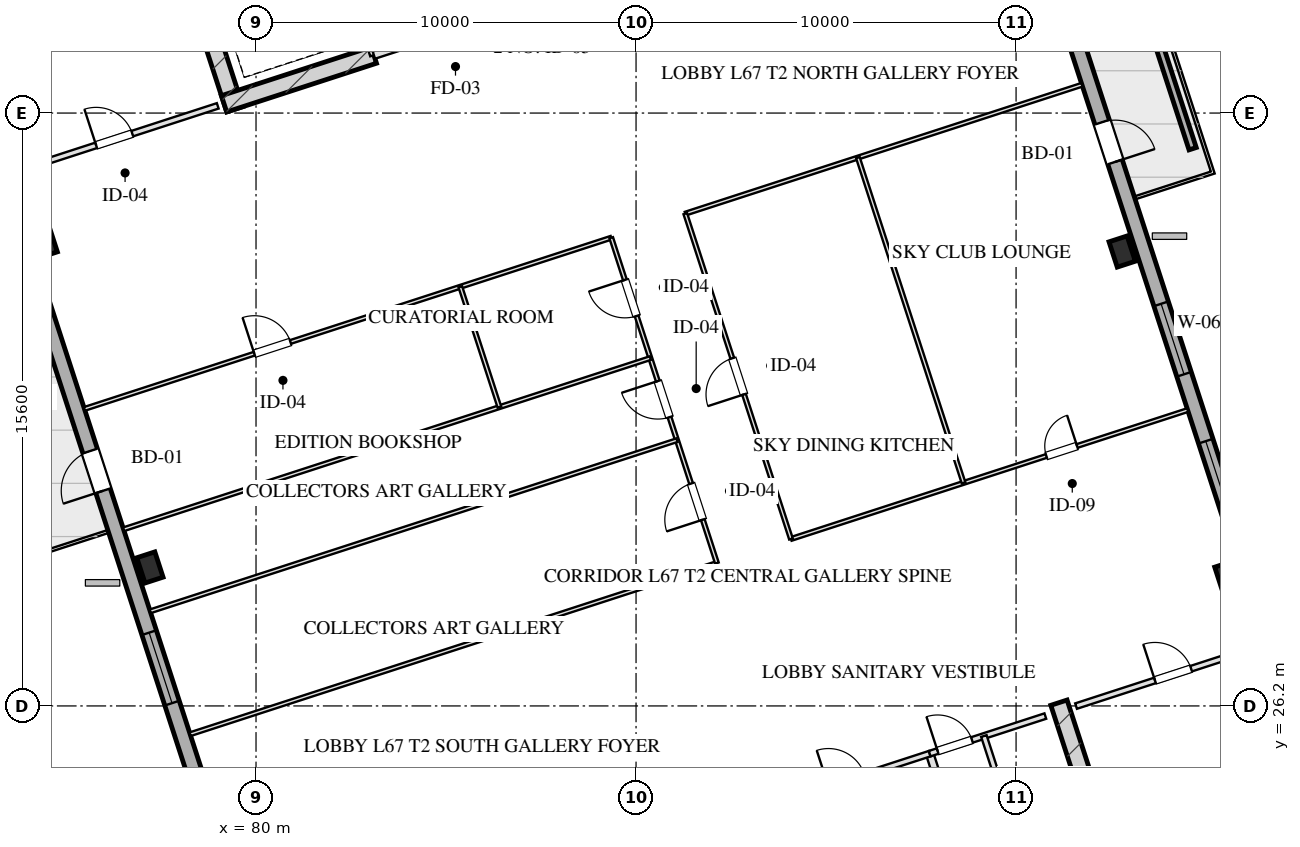
"""IFC4 building model, lengths in metres.
Left out: names, types, materials, properties, quantities, classifications, styles, units other than length and angle.
Written with IfcOpenShell. Run it as: python <this file> out.ifc"""

import sys

from ifc_helpers import new_model, si_unit, direction, frame, frame_2d, origin, origin_2d, place, context, subcontext, project, spatial, rectangle, hollow_rectangle, extrude, element, fill, save


model = new_model("IFC4")
c1 = context("Model", 3, precision=1e-05, world=origin(), true_north=direction((0.0, 1.0)))
c2 = subcontext(c1, "Body", "Model", "MODEL_VIEW")
j1 = project(units=[si_unit("LENGTHUNIT", "METRE"), si_unit("PLANEANGLEUNIT", "RADIAN")], contexts=[c1])
p1 = place(None, origin())
s1 = spatial("IfcSite", under=j1, at=p1, CompositionType="ELEMENT")
p2 = place(p1, origin())
s2 = spatial("IfcBuilding", under=s1, at=p2, CompositionType="ELEMENT")
p3 = place(p2, frame((0.0, 0.0, 247.2)))
s3 = spatial("IfcBuildingStorey", under=s2, at=p3, CompositionType="ELEMENT", Elevation=247.2)
for number, where, z_axis, x_axis in (
    (1, (101.128, 26.286, 0.0), (0.0, 0.0, 1.0), (0.309, -0.951, 0.0)),
    (2, (79.442, 41.899, 0.0), (0.0, 0.0, 1.0), (-0.309, 0.951, 0.0)),
):
    element("IfcWall", number, at=place(p3, frame(where, z_axis=z_axis, x_axis=x_axis)), inside=s3, PredefinedType="SHEAR", context=c2, shape_type="SweptSolid", body=[
        extrude(rectangle(XDim=9.33, YDim=0.45, at=frame_2d((4.665, 0.0))), origin(), (0.0, 0.0, 1.0), 3.2),
    ])
p4 = place(p3, frame((79.159, 42.043, 0.0), z_axis=(0.0, 0.0, 1.0), x_axis=(0.951047485828, 0.309044785913, 0.0)))
e3 = element("IfcWall", 3, at=p4, inside=s3, PredefinedType="SHEAR", context=c2, shape_type="SweptSolid", body=[
    extrude(rectangle(XDim=4.145, YDim=0.45, at=frame_2d((2.073, 0.0))), origin(), (0.0, 0.0, 1.0), 3.2),
])
for number, where, z_axis, x_axis in (
    (4, (77.208, 29.844, 0.0), (0.0, 0.0, 1.0), (0.951, 0.309, 0.0)),
    (5, (74.427, 38.403, 0.0), (0.0, 0.0, 1.0), (0.951, 0.309, 0.0)),
    (6, (105.573, 29.597, 0.0), (0.0, 0.0, 1.0), (0.951, 0.309, 0.0)),
    (7, (102.792, 38.156, 0.0), (0.0, 0.0, 1.0), (0.951, 0.309, 0.0)),
):
    element("IfcColumn", number, at=place(p3, frame(where, z_axis=z_axis, x_axis=x_axis)), inside=s3, PredefinedType="COLUMN", context=c2, shape_type="SweptSolid", body=[
        extrude(hollow_rectangle(XDim=0.5, YDim=0.7, WallThickness=0.025, at=origin_2d()), origin(), (0.0, 0.0, 1.0), 3.201),
    ])
p5 = place(p3, frame((82.618, 11.414, 0.0), z_axis=(0.0, 0.0, 1.0), x_axis=(-0.309016491071, 0.951056679828, 0.0)))
e8 = element("IfcWall", 8, at=p5, inside=s3, PredefinedType="SOLIDWALL", context=c2, shape_type="SweptSolid", body=[
    extrude(rectangle(XDim=38.4, YDim=0.4, at=frame_2d((19.2, 0.0))), origin(), (0.0, 0.0, 1.0), 2.36),
])
p6 = place(p5, frame((11.825, 0.0, 0.75)))
e9 = element("IfcOpeningElement", 9, at=p6, cuts=e8, PredefinedType="OPENING", context=c2, shape_type="SweptSolid", body=[
    extrude(rectangle(XDim=1.95, YDim=1.21, at=frame_2d((0.975, 0.605))), frame((0.0, 0.21, 0.0), z_axis=(0.0, -1.0, 0.0), x_axis=(1.0, 0.0, 0.0)), (0.0, 0.0, 1.0), 0.42),
])
p7 = place(p5, frame((15.625, 0.0, 0.75)))
e10 = element("IfcOpeningElement", 10, at=p7, cuts=e8, PredefinedType="OPENING", context=c2, shape_type="SweptSolid", body=[
    extrude(rectangle(XDim=1.95, YDim=1.21, at=frame_2d((0.975, 0.605))), frame((0.0, 0.21, 0.0), z_axis=(0.0, -1.0, 0.0), x_axis=(1.0, 0.0, 0.0)), (0.0, 0.0, 1.0), 0.42),
])
p8 = place(p5, frame((21.5, 0.0, 0.0)))
e11 = element("IfcOpeningElement", 11, at=p8, cuts=e8, PredefinedType="OPENING", context=c2, shape_type="SweptSolid", body=[
    extrude(rectangle(XDim=1.1, YDim=2.15, at=frame_2d((0.55, 1.075))), frame((0.0, 0.21, 0.0), z_axis=(0.0, -1.0, 0.0), x_axis=(1.0, 0.0, 0.0)), (0.0, 0.0, 1.0), 0.42),
])
p9 = place(p3, frame((97.382, 56.586, 0.0), z_axis=(0.0, 0.0, 1.0), x_axis=(0.309016491071, -0.951056679828, 0.0)))
e12 = element("IfcWall", 12, at=p9, inside=s3, PredefinedType="SOLIDWALL", context=c2, shape_type="SweptSolid", body=[
    extrude(rectangle(XDim=38.4, YDim=0.4, at=frame_2d((19.2, 0.0))), origin(), (0.0, 0.0, 1.0), 2.36),
])
p10 = place(p9, frame((24.625, 0.0, 0.75)))
e13 = element("IfcOpeningElement", 13, at=p10, cuts=e12, PredefinedType="OPENING", context=c2, shape_type="SweptSolid", body=[
    extrude(rectangle(XDim=1.95, YDim=1.21, at=frame_2d((0.975, 0.605))), frame((0.0, 0.21, 0.0), z_axis=(0.0, -1.0, 0.0), x_axis=(1.0, 0.0, 0.0)), (0.0, 0.0, 1.0), 0.42),
])
p11 = place(p9, frame((20.825, 0.0, 0.75)))
e14 = element("IfcOpeningElement", 14, at=p11, cuts=e12, PredefinedType="OPENING", context=c2, shape_type="SweptSolid", body=[
    extrude(rectangle(XDim=1.95, YDim=1.21, at=frame_2d((0.975, 0.605))), frame((0.0, 0.21, 0.0), z_axis=(0.0, -1.0, 0.0), x_axis=(1.0, 0.0, 0.0)), (0.0, 0.0, 1.0), 0.42),
])
p12 = place(p9, frame((15.8, 0.0, 0.0)))
e15 = element("IfcOpeningElement", 15, at=p12, cuts=e12, PredefinedType="OPENING", context=c2, shape_type="SweptSolid", body=[
    extrude(rectangle(XDim=1.1, YDim=2.15, at=frame_2d((0.55, 1.075))), frame((0.0, 0.21, 0.0), z_axis=(0.0, -1.0, 0.0), x_axis=(1.0, 0.0, 0.0)), (0.0, 0.0, 1.0), 0.42),
])
p13 = place(p3, frame((104.646, 40.862, 0.0), z_axis=(0.0, 0.0, 1.0), x_axis=(-0.309032019345, 0.951051634255, 0.0)))
e16 = element("IfcWall", 16, at=p13, inside=s3, PredefinedType="PARAPET", context=c2, shape_type="SweptSolid", body=[
    extrude(rectangle(XDim=4.8, YDim=0.2, at=frame_2d((2.4, 0.0))), origin(), (0.0, 0.0, 1.0), 0.75),
])
p14 = place(p3, frame((97.727, 24.944, 0.0), z_axis=(0.0, 0.0, 1.0), x_axis=(0.309016001439, -0.951056838919, 0.0)))
e17 = element("IfcWall", 17, at=p14, inside=s3, PredefinedType="PARTITIONING", context=c2, shape_type="SweptSolid", body=[
    extrude(rectangle(XDim=8.43, YDim=0.2, at=frame_2d((4.215, 0.0))), origin(), (0.0, 0.0, 1.0), 2.925),
])
p15 = place(p3, frame((93.542, 23.585, 0.0), z_axis=(0.0, 0.0, 1.0), x_axis=(0.951063829732, 0.308994485023, 0.0)))
e18 = element("IfcWall", 18, at=p15, inside=s3, PredefinedType="PARTITIONING", context=c2, shape_type="SweptSolid", body=[
    extrude(rectangle(XDim=4.4, YDim=0.15, at=frame_2d((2.2, 0.0))), origin(), (0.0, 0.0, 1.0), 2.925),
])
p16 = place(p15, frame((1.6, 0.0, 0.0)))
e19 = element("IfcOpeningElement", 19, at=p16, cuts=e18, PredefinedType="OPENING", context=c2, shape_type="SweptSolid", body=[
    extrude(rectangle(XDim=1.0, YDim=2.05, at=frame_2d((0.5, 1.025))), frame((0.0, 0.085, 0.0), z_axis=(0.0, -1.0, 0.0), x_axis=(1.0, 0.0, 0.0)), (0.0, 0.0, 1.0), 0.17),
])
p17 = place(p3, frame((97.727, 24.944, 0.0), z_axis=(0.0, 0.0, 1.0), x_axis=(0.951036872128, 0.309077446369, 0.0)))
e20 = element("IfcWall", 20, at=p17, inside=s3, PredefinedType="PARTITIONING", context=c2, shape_type="SweptSolid", body=[
    extrude(rectangle(XDim=3.2, YDim=0.15, at=frame_2d((1.6, 0.0))), origin(), (0.0, 0.0, 1.0), 2.925),
])
p18 = place(p17, frame((0.22, 0.0, 0.0)))
e21 = element("IfcOpeningElement", 21, at=p18, cuts=e20, PredefinedType="OPENING", context=c2, shape_type="SweptSolid", body=[
    extrude(rectangle(XDim=0.95, YDim=2.05, at=frame_2d((0.475, 1.025))), frame((0.0, 0.085, 0.0), z_axis=(0.0, -1.0, 0.0), x_axis=(1.0, 0.0, 0.0)), (0.0, 0.0, 1.0), 0.17),
])
p19 = place(p3, frame((99.153, 25.408, 0.0), z_axis=(0.0, 0.0, 1.0), x_axis=(0.309016001439, -0.951056838919, 0.0)))
e22 = element("IfcWall", 22, at=p19, inside=s3, PredefinedType="PARTITIONING", context=c2, shape_type="SweptSolid", body=[
    extrude(rectangle(XDim=8.43, YDim=0.15, at=frame_2d((4.215, 0.0))), origin(), (0.0, 0.0, 1.0), 2.925),
])
p20 = place(p19, frame((2.55, 0.0, 0.0)))
e23 = element("IfcOpeningElement", 23, at=p20, cuts=e22, PredefinedType="OPENING", context=c2, shape_type="SweptSolid", body=[
    extrude(rectangle(XDim=0.95, YDim=2.05, at=frame_2d((0.475, 1.025))), frame((0.0, 0.085, 0.0), z_axis=(0.0, -1.0, 0.0), x_axis=(1.0, 0.0, 0.0)), (0.0, 0.0, 1.0), 0.17),
])
p21 = place(p19, frame((4.7, 0.0, 0.0)))
e24 = element("IfcOpeningElement", 24, at=p21, cuts=e22, PredefinedType="OPENING", context=c2, shape_type="SweptSolid", body=[
    extrude(rectangle(XDim=0.9, YDim=2.05, at=frame_2d((0.45, 1.025))), frame((0.0, 0.085, 0.0), z_axis=(0.0, -1.0, 0.0), x_axis=(1.0, 0.0, 0.0)), (0.0, 0.0, 1.0), 0.17),
])
p22 = place(p19, frame((6.8, 0.0, 0.0)))
e25 = element("IfcOpeningElement", 25, at=p22, cuts=e22, PredefinedType="OPENING", context=c2, shape_type="SweptSolid", body=[
    extrude(rectangle(XDim=0.9, YDim=2.05, at=frame_2d((0.45, 1.025))), frame((0.0, 0.085, 0.0), z_axis=(0.0, -1.0, 0.0), x_axis=(1.0, 0.0, 0.0)), (0.0, 0.0, 1.0), 0.17),
])
p23 = place(p3, frame((83.101, 43.324, 0.0), z_axis=(0.0, 0.0, 1.0), x_axis=(-0.309048298632, 0.951046344356, 0.0)))
e26 = element("IfcWall", 26, at=p23, inside=s3, PredefinedType="PARTITIONING", context=c2, shape_type="SweptSolid", body=[
    extrude(rectangle(XDim=1.9, YDim=0.2, at=frame_2d((0.95, 0.0))), origin(), (0.0, 0.0, 1.0), 2.925),
])
p24 = place(p23, frame((0.52, 0.0, 0.0)))
e27 = element("IfcOpeningElement", 27, at=p24, cuts=e26, PredefinedType="OPENING", context=c2, shape_type="SweptSolid", body=[
    extrude(rectangle(XDim=1.1, YDim=2.05, at=frame_2d((0.55, 1.025))), frame((0.0, 0.11, 0.0), z_axis=(0.0, -1.0, 0.0), x_axis=(1.0, 0.0, 0.0)), (0.0, 0.0, 1.0), 0.22),
])
p25 = place(p3, frame((83.101, 43.324, 0.0), z_axis=(0.0, 0.0, 1.0), x_axis=(0.951052804469, 0.309028417967, 0.0)))
e28 = element("IfcWall", 28, at=p25, inside=s3, PredefinedType="PARTITIONING", context=c2, shape_type="SweptSolid", body=[
    extrude(rectangle(XDim=3.83, YDim=0.2, at=frame_2d((1.915, 0.0))), origin(), (0.0, 0.0, 1.0), 2.925),
])
p26 = place(p25, frame((1.35, 0.0, 0.0)))
e29 = element("IfcOpeningElement", 29, at=p26, cuts=e28, PredefinedType="OPENING", context=c2, shape_type="SweptSolid", body=[
    extrude(rectangle(XDim=1.2, YDim=2.05, at=frame_2d((0.6, 1.025))), frame((0.0, 0.11, 0.0), z_axis=(0.0, -1.0, 0.0), x_axis=(1.0, 0.0, 0.0)), (0.0, 0.0, 1.0), 0.22),
])
p27 = place(p3, frame((101.578, 26.196, 0.0), z_axis=(0.0, 0.0, 1.0), x_axis=(0.951064427824, 0.308992644131, 0.0)))
e30 = element("IfcWall", 30, at=p27, inside=s3, PredefinedType="PARTITIONING", context=c2, shape_type="SweptSolid", body=[
    extrude(rectangle(XDim=5.2, YDim=0.15, at=frame_2d((2.6, 0.0))), origin(), (0.0, 0.0, 1.0), 2.925),
])
p28 = place(p27, frame((2.184, 0.0, 0.0)))
e31 = element("IfcOpeningElement", 31, at=p28, cuts=e30, PredefinedType="OPENING", context=c2, shape_type="SweptSolid", body=[
    extrude(rectangle(XDim=1.0, YDim=2.05, at=frame_2d((0.5, 1.025))), frame((0.0, 0.085, 0.0), z_axis=(0.0, -1.0, 0.0), x_axis=(1.0, 0.0, 0.0)), (0.0, 0.0, 1.0), 0.17),
])
p29 = place(p3, frame((73.476, 40.197, 0.0), z_axis=(0.0, 0.0, 1.0), x_axis=(0.951059431056, 0.309008023519, 0.0)))
e32 = element("IfcWall", 32, at=p29, inside=s3, PredefinedType="PARTITIONING", context=c2, shape_type="SweptSolid", body=[
    extrude(rectangle(XDim=5.8, YDim=0.15, at=frame_2d((2.9, 0.0))), origin(), (0.0, 0.0, 1.0), 2.925),
])
p30 = place(p29, frame((2.436, 0.0, 0.0)))
e33 = element("IfcOpeningElement", 33, at=p30, cuts=e32, PredefinedType="OPENING", context=c2, shape_type="SweptSolid", body=[
    extrude(rectangle(XDim=1.0, YDim=2.05, at=frame_2d((0.5, 1.025))), frame((0.0, 0.085, 0.0), z_axis=(0.0, -1.0, 0.0), x_axis=(1.0, 0.0, 0.0)), (0.0, 0.0, 1.0), 0.17),
])
p31 = place(p3, frame((78.266, 25.456, 0.0), z_axis=(0.0, 0.0, 1.0), x_axis=(0.951056346912, 0.309017515681, 0.0)))
e34 = element("IfcWall", 34, at=p31, inside=s3, PredefinedType="MOVABLE", context=c2, shape_type="SweptSolid", body=[
    extrude(rectangle(XDim=14.575, YDim=0.1, at=frame_2d((7.288, 0.0))), origin(), (0.0, 0.0, 1.0), 2.925),
])
p32 = place(p3, frame((94.077, 30.593, 0.0), z_axis=(0.0, 0.0, 1.0), x_axis=(0.951058423821, 0.309011123554, 0.0)))
e35 = element("IfcWall", 35, at=p32, inside=s3, PredefinedType="MOVABLE", context=c2, shape_type="SweptSolid", body=[
    extrude(rectangle(XDim=10.975, YDim=0.1, at=frame_2d((5.487, 0.0))), origin(), (0.0, 0.0, 1.0), 2.925),
])
p33 = place(p32, frame((7.065, 0.0, 0.0)))
e36 = element("IfcOpeningElement", 36, at=p33, cuts=e35, PredefinedType="OPENING", context=c2, shape_type="SweptSolid", body=[
    extrude(rectangle(XDim=0.85, YDim=2.05, at=frame_2d((0.425, 1.025))), frame((0.0, 0.06, 0.0), z_axis=(0.0, -1.0, 0.0), x_axis=(1.0, 0.0, 0.0)), (0.0, 0.0, 1.0), 0.12),
])
p34 = place(p3, frame((75.485, 34.015, 0.0), z_axis=(0.0, 0.0, 1.0), x_axis=(0.951056346912, 0.309017515681, 0.0)))
e37 = element("IfcWall", 37, at=p34, inside=s3, PredefinedType="MOVABLE", context=c2, shape_type="SweptSolid", body=[
    extrude(rectangle(XDim=14.575, YDim=0.1, at=frame_2d((7.288, 0.0))), origin(), (0.0, 0.0, 1.0), 2.925),
])
p35 = place(p34, frame((4.7, 0.0, 0.0)))
e38 = element("IfcOpeningElement", 38, at=p35, cuts=e37, PredefinedType="OPENING", context=c2, shape_type="SweptSolid", body=[
    extrude(rectangle(XDim=1.0, YDim=2.05, at=frame_2d((0.5, 1.025))), frame((0.0, 0.06, 0.0), z_axis=(0.0, -1.0, 0.0), x_axis=(1.0, 0.0, 0.0)), (0.0, 0.0, 1.0), 0.12),
])
p36 = place(p3, frame((91.296, 39.153, 0.0), z_axis=(0.0, 0.0, 1.0), x_axis=(0.951058423821, 0.309011123554, 0.0)))
e39 = element("IfcWall", 39, at=p36, inside=s3, PredefinedType="MOVABLE", context=c2, shape_type="SweptSolid", body=[
    extrude(rectangle(XDim=10.975, YDim=0.1, at=frame_2d((5.487, 0.0))), origin(), (0.0, 0.0, 1.0), 2.925),
])
p37 = place(p3, frame((92.128, 29.96, 0.0), z_axis=(0.0, 0.0, 1.0), x_axis=(-0.309024734286, 0.951054001411, 0.0)))
e40 = element("IfcWall", 40, at=p37, inside=s3, PredefinedType="MOVABLE", context=c2, shape_type="SweptSolid", body=[
    extrude(rectangle(XDim=9.0, YDim=0.1, at=frame_2d((4.5, 0.0))), origin(), (0.0, 0.0, 1.0), 2.925),
])
p38 = place(p37, frame((1.2, 0.0, 0.0)))
e41 = element("IfcOpeningElement", 41, at=p38, cuts=e40, PredefinedType="OPENING", context=c2, shape_type="SweptSolid", body=[
    extrude(rectangle(XDim=1.0, YDim=2.05, at=frame_2d((0.5, 1.025))), frame((0.0, 0.06, 0.0), z_axis=(0.0, -1.0, 0.0), x_axis=(1.0, 0.0, 0.0)), (0.0, 0.0, 1.0), 0.12),
])
p39 = place(p37, frame((4.035, 0.0, 0.0)))
e42 = element("IfcOpeningElement", 42, at=p39, cuts=e40, PredefinedType="OPENING", context=c2, shape_type="SweptSolid", body=[
    extrude(rectangle(XDim=1.0, YDim=2.05, at=frame_2d((0.5, 1.025))), frame((0.0, 0.06, 0.0), z_axis=(0.0, -1.0, 0.0), x_axis=(1.0, 0.0, 0.0)), (0.0, 0.0, 1.0), 0.12),
])
p40 = place(p37, frame((6.835, 0.0, 0.0)))
e43 = element("IfcOpeningElement", 43, at=p40, cuts=e40, PredefinedType="OPENING", context=c2, shape_type="SweptSolid", body=[
    extrude(rectangle(XDim=1.0, YDim=2.05, at=frame_2d((0.5, 1.025))), frame((0.0, 0.06, 0.0), z_axis=(0.0, -1.0, 0.0), x_axis=(1.0, 0.0, 0.0)), (0.0, 0.0, 1.0), 0.12),
])
p41 = place(p3, frame((94.077, 30.593, 0.0), z_axis=(0.0, 0.0, 1.0), x_axis=(-0.309024734286, 0.951054001411, 0.0)))
e44 = element("IfcWall", 44, at=p41, inside=s3, PredefinedType="MOVABLE", context=c2, shape_type="SweptSolid", body=[
    extrude(rectangle(XDim=9.0, YDim=0.1, at=frame_2d((4.5, 0.0))), origin(), (0.0, 0.0, 1.0), 2.925),
])
p42 = place(p41, frame((4.0, 0.0, 0.0)))
e45 = element("IfcOpeningElement", 45, at=p42, cuts=e44, PredefinedType="OPENING", context=c2, shape_type="SweptSolid", body=[
    extrude(rectangle(XDim=1.0, YDim=2.05, at=frame_2d((0.5, 1.025))), frame((0.0, 0.06, 0.0), z_axis=(0.0, -1.0, 0.0), x_axis=(1.0, 0.0, 0.0)), (0.0, 0.0, 1.0), 0.12),
])
for number, where, z_axis, x_axis in (
    (46, (77.215, 28.689, 0.0), (0.0, 0.0, 1.0), (0.951, 0.309, 0.0)),
    (47, (76.514, 30.848, 0.0), (0.0, 0.0, 1.0), (0.951, 0.309, 0.0)),
):
    element("IfcWall", number, at=place(p3, frame(where, z_axis=z_axis, x_axis=x_axis)), inside=s3, PredefinedType="MOVABLE", context=c2, shape_type="SweptSolid", body=[
        extrude(rectangle(XDim=14.575, YDim=0.1, at=frame_2d((7.288, 0.0))), origin(), (0.0, 0.0, 1.0), 2.925),
    ])
p43 = place(p3, frame((86.405, 34.062, 0.0), z_axis=(0.0, 0.0, 1.0), x_axis=(-0.309026391202, 0.95105346303, 0.0)))
e48 = element("IfcWall", 48, at=p43, inside=s3, PredefinedType="MOVABLE", context=c2, shape_type="SweptSolid", body=[
    extrude(rectangle(XDim=3.33, YDim=0.1, at=frame_2d((1.665, 0.0))), origin(), (0.0, 0.0, 1.0), 2.925),
])
p44 = place(p3, frame((98.619, 32.069, 0.0), z_axis=(0.0, 0.0, 1.0), x_axis=(-0.309032706929, 0.951051410833, 0.0)))
e49 = element("IfcWall", 49, at=p44, inside=s3, PredefinedType="MOVABLE", context=c2, shape_type="SweptSolid", body=[
    extrude(rectangle(XDim=9.0, YDim=0.1, at=frame_2d((4.5, 0.0))), origin(), (0.0, 0.0, 1.0), 2.925),
])
p45 = place(p7, origin())
e50 = element("IfcWindow", 50, at=p45, inside=s3, PartitioningType="TRIPLE_PANEL_VERTICAL", PredefinedType="WINDOW", context=c2, shape_type="SweptSolid", body=[
    extrude(rectangle(XDim=1.95, YDim=1.21, at=frame_2d((0.975, 0.605))), frame((0.0, 0.03, 0.0), z_axis=(0.0, -1.0, 0.0), x_axis=(1.0, 0.0, 0.0)), (0.0, 0.0, 1.0), 0.06),
])
fill(e10, e50)
p46 = place(p10, origin())
e51 = element("IfcWindow", 51, at=p46, inside=s3, PartitioningType="TRIPLE_PANEL_VERTICAL", PredefinedType="WINDOW", context=c2, shape_type="SweptSolid", body=[
    extrude(rectangle(XDim=1.95, YDim=1.21, at=frame_2d((0.975, 0.605))), frame((0.0, 0.03, 0.0), z_axis=(0.0, -1.0, 0.0), x_axis=(1.0, 0.0, 0.0)), (0.0, 0.0, 1.0), 0.06),
])
fill(e13, e51)
p47 = place(p11, origin())
e52 = element("IfcWindow", 52, at=p47, inside=s3, PartitioningType="TRIPLE_PANEL_VERTICAL", PredefinedType="WINDOW", context=c2, shape_type="SweptSolid", body=[
    extrude(rectangle(XDim=1.95, YDim=1.21, at=frame_2d((0.975, 0.605))), frame((0.0, 0.03, 0.0), z_axis=(0.0, -1.0, 0.0), x_axis=(1.0, 0.0, 0.0)), (0.0, 0.0, 1.0), 0.06),
])
fill(e14, e52)
p48 = place(p8, origin())
e53 = element("IfcDoor", 53, at=p48, inside=s3, OperationType="SINGLE_SWING_LEFT", PredefinedType="DOOR", context=c2, shape_type="SweptSolid", body=[
    extrude(rectangle(XDim=1.1, YDim=2.15, at=frame_2d((0.55, 1.075))), frame((0.0, 0.025, 0.0), z_axis=(0.0, -1.0, 0.0), x_axis=(1.0, 0.0, 0.0)), (0.0, 0.0, 1.0), 0.05),
])
fill(e11, e53)
p49 = place(p12, origin())
e54 = element("IfcDoor", 54, at=p49, inside=s3, OperationType="SINGLE_SWING_RIGHT", PredefinedType="DOOR", context=c2, shape_type="SweptSolid", body=[
    extrude(rectangle(XDim=1.1, YDim=2.15, at=frame_2d((0.55, 1.075))), frame((0.0, 0.025, 0.0), z_axis=(0.0, -1.0, 0.0), x_axis=(1.0, 0.0, 0.0)), (0.0, 0.0, 1.0), 0.05),
])
fill(e15, e54)
p50 = place(p18, origin())
e55 = element("IfcDoor", 55, at=p50, inside=s3, OperationType="SINGLE_SWING_LEFT", PredefinedType="DOOR", context=c2, shape_type="SweptSolid", body=[
    extrude(rectangle(XDim=0.95, YDim=2.05, at=frame_2d((0.475, 1.025))), frame((0.0, 0.025, 0.0), z_axis=(0.0, -1.0, 0.0), x_axis=(1.0, 0.0, 0.0)), (0.0, 0.0, 1.0), 0.05),
])
fill(e21, e55)
p51 = place(p28, origin())
e56 = element("IfcDoor", 56, at=p51, inside=s3, OperationType="SINGLE_SWING_LEFT", PredefinedType="DOOR", context=c2, shape_type="SweptSolid", body=[
    extrude(rectangle(XDim=1.0, YDim=2.05, at=frame_2d((0.5, 1.025))), frame((0.0, 0.025, 0.0), z_axis=(0.0, -1.0, 0.0), x_axis=(1.0, 0.0, 0.0)), (0.0, 0.0, 1.0), 0.05),
])
fill(e31, e56)
p52 = place(p30, origin())
e57 = element("IfcDoor", 57, at=p52, inside=s3, OperationType="SINGLE_SWING_LEFT", PredefinedType="DOOR", context=c2, shape_type="SweptSolid", body=[
    extrude(rectangle(XDim=1.0, YDim=2.05, at=frame_2d((0.5, 1.025))), frame((0.0, 0.025, 0.0), z_axis=(0.0, -1.0, 0.0), x_axis=(1.0, 0.0, 0.0)), (0.0, 0.0, 1.0), 0.05),
])
fill(e33, e57)
p53 = place(p33, origin())
e58 = element("IfcDoor", 58, at=p53, inside=s3, OperationType="SINGLE_SWING_RIGHT", PredefinedType="DOOR", context=c2, shape_type="SweptSolid", body=[
    extrude(rectangle(XDim=0.85, YDim=2.05, at=frame_2d((0.425, 1.025))), frame((0.0, 0.025, 0.0), z_axis=(0.0, -1.0, 0.0), x_axis=(1.0, 0.0, 0.0)), (0.0, 0.0, 1.0), 0.05),
])
fill(e36, e58)
p54 = place(p35, origin())
e59 = element("IfcDoor", 59, at=p54, inside=s3, OperationType="SINGLE_SWING_LEFT", PredefinedType="DOOR", context=c2, shape_type="SweptSolid", body=[
    extrude(rectangle(XDim=1.0, YDim=2.05, at=frame_2d((0.5, 1.025))), frame((0.0, 0.025, 0.0), z_axis=(0.0, -1.0, 0.0), x_axis=(1.0, 0.0, 0.0)), (0.0, 0.0, 1.0), 0.05),
])
fill(e38, e59)
p55 = place(p38, origin())
e60 = element("IfcDoor", 60, at=p55, inside=s3, OperationType="SINGLE_SWING_LEFT", PredefinedType="DOOR", context=c2, shape_type="SweptSolid", body=[
    extrude(rectangle(XDim=1.0, YDim=2.05, at=frame_2d((0.5, 1.025))), frame((0.0, 0.025, 0.0), z_axis=(0.0, -1.0, 0.0), x_axis=(1.0, 0.0, 0.0)), (0.0, 0.0, 1.0), 0.05),
])
fill(e41, e60)
p56 = place(p39, origin())
e61 = element("IfcDoor", 61, at=p56, inside=s3, OperationType="SINGLE_SWING_RIGHT", PredefinedType="DOOR", context=c2, shape_type="SweptSolid", body=[
    extrude(rectangle(XDim=1.0, YDim=2.05, at=frame_2d((0.5, 1.025))), frame((0.0, 0.025, 0.0), z_axis=(0.0, -1.0, 0.0), x_axis=(1.0, 0.0, 0.0)), (0.0, 0.0, 1.0), 0.05),
])
fill(e42, e61)
p57 = place(p40, origin())
e62 = element("IfcDoor", 62, at=p57, inside=s3, OperationType="SINGLE_SWING_RIGHT", PredefinedType="DOOR", context=c2, shape_type="SweptSolid", body=[
    extrude(rectangle(XDim=1.0, YDim=2.05, at=frame_2d((0.5, 1.025))), frame((0.0, 0.025, 0.0), z_axis=(0.0, -1.0, 0.0), x_axis=(1.0, 0.0, 0.0)), (0.0, 0.0, 1.0), 0.05),
])
fill(e43, e62)
p58 = place(p42, origin())
e63 = element("IfcDoor", 63, at=p58, inside=s3, OperationType="SINGLE_SWING_LEFT", PredefinedType="DOOR", context=c2, shape_type="SweptSolid", body=[
    extrude(rectangle(XDim=1.0, YDim=2.05, at=frame_2d((0.5, 1.025))), frame((0.0, 0.025, 0.0), z_axis=(0.0, -1.0, 0.0), x_axis=(1.0, 0.0, 0.0)), (0.0, 0.0, 1.0), 0.05),
])
fill(e45, e63)
save(model, sys.argv[1])
